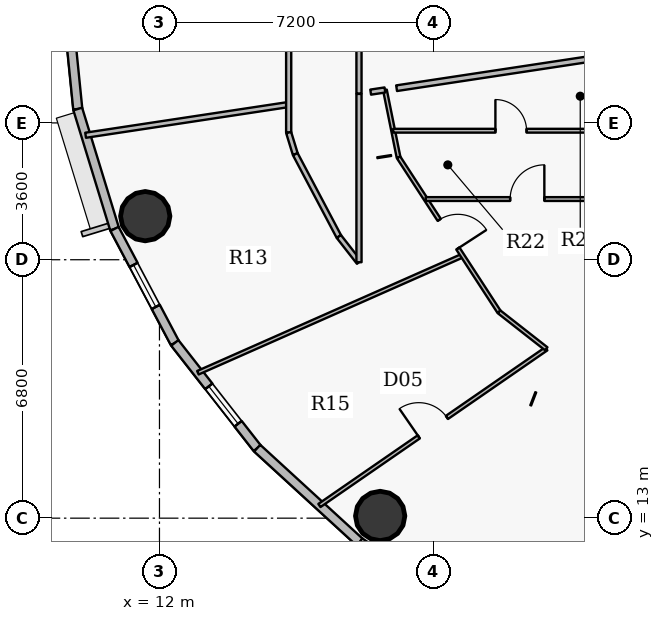
"""IFC4 building model, lengths in metres.
Left out: names, types, materials, properties, quantities, classifications, styles, units other than length and angle.
Written with IfcOpenShell. Run it as: python <this file> out.ifc"""

import sys

from ifc_helpers import new_model, si_unit, direction, frame, frame_2d, origin, origin_2d, place, context, subcontext, project, spatial, rectangle, hollow_circle, extrude, source, transform, mapped, element, fill, save


model = new_model("IFC4")
c1 = context("Model", 3, precision=1e-05, world=origin(), true_north=direction((0.0, 1.0)))
c2 = subcontext(c1, "Body", "Model", "MODEL_VIEW")
j1 = project(units=[si_unit("LENGTHUNIT", "METRE"), si_unit("PLANEANGLEUNIT", "RADIAN")], contexts=[c1])
p1 = place(None, origin())
s1 = spatial("IfcSite", under=j1, at=p1, CompositionType="ELEMENT")
p2 = place(p1, origin())
s2 = spatial("IfcBuilding", under=s1, at=p2, CompositionType="ELEMENT")
p3 = place(p2, frame((0.0, 0.0, 156.15)))
s3 = spatial("IfcBuildingStorey", under=s2, at=p3, CompositionType="ELEMENT", Elevation=156.15)
for number, where, z_axis, x_axis in (
    (1, (11.625, 20.947, 0.0), (0.0, 0.0, 1.0), (1.0, 0.0, 0.0)),
    (2, (17.808, 13.058, 0.0), (0.0, 0.0, 1.0), (1.0, 0.0, 0.0)),
):
    element("IfcColumn", number, at=place(p3, frame(where, z_axis=z_axis, x_axis=x_axis)), inside=s3, PredefinedType="COLUMN", context=c2, shape_type="SweptSolid", body=[
        extrude(hollow_circle(Radius=0.65, WallThickness=0.04, at=origin_2d()), origin(), (0.0, 0.0, 1.0), 3.75),
    ])
p4 = place(p3, frame((9.85, 23.766, 0.0), z_axis=(0.0, 0.0, 1.0), x_axis=(-0.100061534614, 0.994981250723, 0.0)))
e3 = element("IfcWall", 3, at=p4, inside=s3, PredefinedType="SOLIDWALL", context=c2, shape_type="SweptSolid", body=[
    extrude(rectangle(XDim=3.25, YDim=0.24, at=frame_2d((1.625, 0.0))), origin(), (0.0, 0.0, 1.0), 3.5),
])
p5 = place(p3, frame((10.817, 20.611, 0.0), z_axis=(0.0, 0.0, 1.0), x_axis=(-0.293097995113, 0.956082405058, 0.0)))
e4 = element("IfcWall", 4, at=p5, inside=s3, PredefinedType="SOLIDWALL", context=c2, shape_type="SweptSolid", body=[
    extrude(rectangle(XDim=3.3, YDim=0.24, at=frame_2d((1.65, 0.0))), origin(), (0.0, 0.0, 1.0), 3.5),
])
p6 = place(p3, frame((12.404, 17.612, 0.0), z_axis=(0.0, 0.0, 1.0), x_axis=(-0.467586874938, 0.88394712194, 0.0)))
e5 = element("IfcWall", 5, at=p6, inside=s3, PredefinedType="SOLIDWALL", context=c2, shape_type="SweptSolid", body=[
    extrude(rectangle(XDim=3.393, YDim=0.24, at=frame_2d((1.697, 0.0))), origin(), (0.0, 0.0, 1.0), 3.5),
])
p7 = place(p6, frame((1.072, 0.0, 0.9)))
e6 = element("IfcOpeningElement", 6, at=p7, cuts=e5, PredefinedType="OPENING", context=c2, shape_type="SweptSolid", body=[
    extrude(rectangle(XDim=1.25, YDim=1.65, at=origin_2d()), frame((0.625, 0.13, 0.825), z_axis=(0.0, -1.0, 0.0), x_axis=(1.0, 0.0, 0.0)), (0.0, 0.0, 1.0), 0.26),
])
p8 = place(p3, frame((14.572, 14.842, 0.0), z_axis=(0.0, 0.0, 1.0), x_axis=(-0.616287674549, 0.787521112224, 0.0)))
e7 = element("IfcWall", 7, at=p8, inside=s3, PredefinedType="SOLIDWALL", context=c2, shape_type="SweptSolid", body=[
    extrude(rectangle(XDim=3.517, YDim=0.24, at=frame_2d((1.759, 0.0))), origin(), (0.0, 0.0, 1.0), 3.5),
])
p9 = place(p8, frame((0.816, 0.0, 0.9)))
e8 = element("IfcOpeningElement", 8, at=p9, cuts=e7, PredefinedType="OPENING", context=c2, shape_type="SweptSolid", body=[
    extrude(rectangle(XDim=1.25, YDim=1.65, at=origin_2d()), frame((0.625, 0.13, 0.825), z_axis=(0.0, -1.0, 0.0), x_axis=(1.0, 0.0, 0.0)), (0.0, 0.0, 1.0), 0.26),
])
p10 = place(p3, frame((17.268, 12.369, 0.0), z_axis=(0.0, 0.0, 1.0), x_axis=(-0.737076565834, 0.675809245349, 0.0)))
e9 = element("IfcWall", 9, at=p10, inside=s3, PredefinedType="SOLIDWALL", context=c2, shape_type="SweptSolid", body=[
    extrude(rectangle(XDim=3.658, YDim=0.24, at=frame_2d((1.829, 0.0))), origin(), (0.0, 0.0, 1.0), 3.5),
])
p11 = place(p3, frame((20.427, 10.257, 0.0), z_axis=(0.0, 0.0, 1.0), x_axis=(-0.831228998277, 0.555930168657, 0.0)))
e10 = element("IfcWall", 10, at=p11, inside=s3, PredefinedType="SOLIDWALL", context=c2, shape_type="SweptSolid", body=[
    extrude(rectangle(XDim=3.8, YDim=0.24, at=frame_2d((1.9, 0.0))), origin(), (0.0, 0.0, 1.0), 3.5),
])
p12 = place(p3, frame((10.057, 23.075, 0.0), z_axis=(0.0, 0.0, 1.0), x_axis=(0.988756022356, 0.14953771516, 0.0)))
e11 = element("IfcWall", 11, at=p12, inside=s3, PredefinedType="PARTITIONING", context=c2, shape_type="SweptSolid", body=[
    extrude(rectangle(XDim=5.404, YDim=0.135, at=frame_2d((2.702, 0.0))), origin(), (0.0, 0.0, 1.0), 2.935),
])
p13 = place(p3, frame((13.012, 16.827, 0.0), z_axis=(0.0, 0.0, 1.0), x_axis=(0.914460954348, 0.404674144185, 0.0)))
e12 = element("IfcWall", 12, at=p13, inside=s3, PredefinedType="PARTITIONING", context=c2, shape_type="SweptSolid", body=[
    extrude(rectangle(XDim=7.614, YDim=0.1, at=frame_2d((3.807, 0.0))), origin(), (0.0, 0.0, 1.0), 2.935),
])
p14 = place(p3, frame((15.4, 23.146, 0.0), z_axis=(0.0, 0.0, 1.0), x_axis=(0.0, 1.0, 0.0)))
e13 = element("IfcWall", 13, at=p14, inside=s3, PredefinedType="PARTITIONING", context=c2, shape_type="SweptSolid", body=[
    extrude(rectangle(XDim=4.804, YDim=0.135, at=frame_2d((2.402, 0.0))), origin(), (0.0, 0.0, 1.0), 2.935),
])
p15 = place(p14, frame((2.251, 0.0, 0.0)))
e14 = element("IfcOpeningElement", 14, at=p15, cuts=e13, PredefinedType="OPENING", context=c2, shape_type="SweptSolid", body=[
    extrude(rectangle(XDim=1.0, YDim=2.15, at=origin_2d()), frame((0.5, 0.078, 1.075), z_axis=(0.0, -1.0, 0.0), x_axis=(1.0, 0.0, 0.0)), (0.0, 0.0, 1.0), 0.155),
])
p16 = place(p3, frame((15.4, 23.146, 0.0), z_axis=(0.0, 0.0, 1.0), x_axis=(0.293335154151, -0.956009669061, 0.0)))
e15 = element("IfcWall", 15, at=p16, inside=s3, PredefinedType="PARTITIONING", context=c2, shape_type="SweptSolid", body=[
    extrude(rectangle(XDim=0.594, YDim=0.135, at=frame_2d((0.297, 0.0))), origin(), (0.0, 0.0, 1.0), 3.5),
])
p17 = place(p3, frame((15.574, 22.578, 0.0), z_axis=(0.0, 0.0, 1.0), x_axis=(0.46757196543, -0.883955008552, 0.0)))
e16 = element("IfcWall", 16, at=p17, inside=s3, PredefinedType="PARTITIONING", context=c2, shape_type="SweptSolid", body=[
    extrude(rectangle(XDim=2.451, YDim=0.135, at=frame_2d((1.226, 0.0))), origin(), (0.0, 0.0, 1.0), 2.935),
])
p18 = place(p3, frame((16.209, 13.333, 0.0), z_axis=(0.0, 0.0, 1.0), x_axis=(0.82287966827, 0.568215673444, 0.0)))
e17 = element("IfcWall", 17, at=p18, inside=s3, PredefinedType="PARTITIONING", context=c2, shape_type="SweptSolid", body=[
    extrude(rectangle(XDim=7.255, YDim=0.1, at=frame_2d((3.628, 0.0))), origin(), (0.0, 0.0, 1.0), 2.935),
])
p19 = place(p18, frame((3.177, 0.0, 0.0)))
e18 = element("IfcOpeningElement", 18, at=p19, cuts=e17, PredefinedType="OPENING", context=c2, shape_type="SweptSolid", body=[
    extrude(rectangle(XDim=0.9, YDim=2.1, at=origin_2d()), frame((0.45, 0.06, 1.05), z_axis=(0.0, -1.0, 0.0), x_axis=(1.0, 0.0, 0.0)), (0.0, 0.0, 1.0), 0.12),
])
p20 = place(p3, frame((16.72, 20.411, 0.0), z_axis=(0.0, 0.0, 1.0), x_axis=(0.616377221056, -0.787451027914, 0.0)))
e19 = element("IfcWall", 19, at=p20, inside=s3, PredefinedType="PARTITIONING", context=c2, shape_type="SweptSolid", body=[
    extrude(rectangle(XDim=0.859, YDim=0.135, at=frame_2d((0.43, 0.0))), origin(), (0.0, 0.0, 1.0), 3.5),
])
p21 = place(p3, frame((17.25, 19.734, 0.0), z_axis=(0.0, 0.0, 1.0), x_axis=(0.0, 1.0, 0.0)))
e20 = element("IfcWall", 20, at=p21, inside=s3, PredefinedType="PARTITIONING", context=c2, shape_type="SweptSolid", body=[
    extrude(rectangle(XDim=4.429, YDim=0.135, at=frame_2d((2.215, 0.0))), origin(), (0.0, 0.0, 1.0), 2.935),
])
p22 = place(p3, frame((17.933, 24.267, 0.0), z_axis=(0.0, 0.0, 1.0), x_axis=(0.198166528342, -0.980168366682, 0.0)))
e21 = element("IfcWall", 21, at=p22, inside=s3, PredefinedType="PARTITIONING", context=c2, shape_type="SweptSolid", body=[
    extrude(rectangle(XDim=1.809, YDim=0.1, at=frame_2d((0.904, 0.0))), origin(), (0.0, 0.0, 1.0), 2.935),
])
p23 = place(p3, frame((18.15, 23.195, 0.0), z_axis=(0.0, 0.0, 1.0), x_axis=(1.0, 0.0, 0.0)))
e22 = element("IfcWall", 22, at=p23, inside=s3, PredefinedType="PARTITIONING", context=c2, shape_type="SweptSolid", body=[
    extrude(rectangle(XDim=6.2, YDim=0.1, at=frame_2d((3.1, 0.0))), origin(), (0.0, 0.0, 1.0), 2.935),
])
p24 = place(p23, frame((2.69, 0.0, 0.0)))
e23 = element("IfcOpeningElement", 23, at=p24, cuts=e22, PredefinedType="OPENING", context=c2, shape_type="SweptSolid", body=[
    extrude(rectangle(XDim=0.82, YDim=2.1, at=origin_2d()), frame((0.41, 0.06, 1.05), z_axis=(0.0, -1.0, 0.0), x_axis=(1.0, 0.0, 0.0)), (0.0, 0.0, 1.0), 0.12),
])
p25 = place(p3, frame((18.291, 22.494, 0.0), z_axis=(0.0, 0.0, 1.0), x_axis=(0.545405921784, -0.838172047066, 0.0)))
e24 = element("IfcWall", 24, at=p25, inside=s3, PredefinedType="PARTITIONING", context=c2, shape_type="SweptSolid", body=[
    extrude(rectangle(XDim=4.849, YDim=0.1, at=frame_2d((2.425, 0.0))), origin(), (0.0, 0.0, 1.0), 2.935),
])
p26 = place(p25, frame((1.962, 0.0, 0.0)))
e25 = element("IfcOpeningElement", 25, at=p26, cuts=e24, PredefinedType="OPENING", context=c2, shape_type="SweptSolid", body=[
    extrude(rectangle(XDim=0.9, YDim=2.1, at=origin_2d()), frame((0.45, 0.06, 1.05), z_axis=(0.0, -1.0, 0.0), x_axis=(1.0, 0.0, 0.0)), (0.0, 0.0, 1.0), 0.12),
])
p27 = place(p3, frame((19.005, 21.397, 0.0), z_axis=(0.0, 0.0, 1.0), x_axis=(1.0, 0.0, 0.0)))
e26 = element("IfcWall", 26, at=p27, inside=s3, PredefinedType="PARTITIONING", context=c2, shape_type="SweptSolid", body=[
    extrude(rectangle(XDim=5.345, YDim=0.1, at=frame_2d((2.672, 0.0))), origin(), (0.0, 0.0, 1.0), 3.5),
])
p28 = place(p27, frame((2.222, 0.0, 0.0)))
e27 = element("IfcOpeningElement", 27, at=p28, cuts=e26, PredefinedType="OPENING", context=c2, shape_type="SweptSolid", body=[
    extrude(rectangle(XDim=0.9, YDim=2.1, at=origin_2d()), frame((0.45, 0.06, 1.05), z_axis=(0.0, -1.0, 0.0), x_axis=(1.0, 0.0, 0.0)), (0.0, 0.0, 1.0), 0.12),
])
p29 = place(p3, frame((20.936, 18.429, 0.0), z_axis=(0.0, 0.0, 1.0), x_axis=(0.787358146927, -0.61649586249, 0.0)))
e28 = element("IfcWall", 28, at=p29, inside=s3, PredefinedType="PARTITIONING", context=c2, shape_type="SweptSolid", body=[
    extrude(rectangle(XDim=1.579, YDim=0.1, at=frame_2d((0.79, 0.0))), origin(), (0.0, 0.0, 1.0), 3.5),
])
p30 = place(p3, frame((17.25, 26.05, 0.0), z_axis=(0.0, 0.0, 1.0), x_axis=(0.0, -1.0, 0.0)))
e29 = element("IfcWall", 29, at=p30, inside=s3, PredefinedType="PARTITIONING", context=c2, shape_type="SweptSolid", body=[
    extrude(rectangle(XDim=1.876, YDim=0.135, at=frame_2d((0.938, 0.0))), origin(), (0.0, 0.0, 1.0), 3.185),
])
p31 = place(p3, frame((17.558, 24.21, 0.0), z_axis=(0.0, 0.0, 1.0), x_axis=(0.988703952477, 0.149881601124, 0.0)))
e30 = element("IfcWall", 30, at=p31, inside=s3, PredefinedType="PARTITIONING", context=c2, shape_type="SweptSolid", body=[
    extrude(rectangle(XDim=0.38, YDim=0.135, at=frame_2d((0.19, 0.0))), origin(), (0.0, 0.0, 1.0), 3.185),
])
p32 = place(p3, frame((18.24, 24.313, 0.0), z_axis=(0.0, 0.0, 1.0), x_axis=(0.988751262043, 0.149569187364, 0.0)))
e31 = element("IfcWall", 31, at=p32, inside=s3, PredefinedType="PARTITIONING", context=c2, shape_type="SweptSolid", body=[
    extrude(rectangle(XDim=5.848, YDim=0.15, at=frame_2d((2.924, 0.0))), origin(), (0.0, 0.0, 1.0), 3.5),
])
m1 = source(origin(), c2, "Body", "SweptSolid", [
    extrude(rectangle(XDim=1.25, YDim=1.65, at=origin_2d()), frame((0.625, 0.03, 0.825), z_axis=(0.0, -1.0, 0.0), x_axis=(1.0, 0.0, 0.0)), (0.0, 0.0, 1.0), 0.06),
])
p33 = place(p9, origin())
e32 = element("IfcWindow", 32, at=p33, inside=s3, PartitioningType="SINGLE_PANEL", PredefinedType="WINDOW", context=c2, shape_type="MappedRepresentation", body=[
    mapped(m1, transform((0.0, 0.0, 0.0), x_axis=(1.0, 0.0, 0.0), y_axis=(0.0, 1.0, 0.0), z_axis=(0.0, 0.0, 1.0), scale=1.0)),
])
fill(e8, e32)
p34 = place(p7, origin())
e33 = element("IfcWindow", 33, at=p34, inside=s3, PartitioningType="SINGLE_PANEL", PredefinedType="WINDOW", context=c2, shape_type="MappedRepresentation", body=[
    mapped(m1, transform((0.0, 0.0, 0.0), x_axis=(1.0, 0.0, 0.0), y_axis=(0.0, 1.0, 0.0), z_axis=(0.0, 0.0, 1.0), scale=1.0)),
])
fill(e6, e33)
m2 = source(origin(), c2, "Body", "SweptSolid", [
    extrude(rectangle(XDim=0.9, YDim=2.1, at=origin_2d()), frame((0.45, 0.025, 1.05), z_axis=(0.0, -1.0, 0.0), x_axis=(1.0, 0.0, 0.0)), (0.0, 0.0, 1.0), 0.05),
])
p35 = place(p26, origin())
e34 = element("IfcDoor", 34, at=p35, inside=s3, OperationType="SINGLE_SWING_RIGHT", PredefinedType="DOOR", context=c2, shape_type="MappedRepresentation", body=[
    mapped(m2, transform((0.0, 0.0, 0.0), x_axis=(1.0, 0.0, 0.0), y_axis=(0.0, 1.0, 0.0), z_axis=(0.0, 0.0, 1.0), scale=1.0)),
])
fill(e25, e34)
p36 = place(p19, origin())
e35 = element("IfcDoor", 35, at=p36, inside=s3, OperationType="SINGLE_SWING_LEFT", PredefinedType="DOOR", context=c2, shape_type="MappedRepresentation", body=[
    mapped(m2, transform((0.0, 0.0, 0.0), x_axis=(1.0, 0.0, 0.0), y_axis=(0.0, 1.0, 0.0), z_axis=(0.0, 0.0, 1.0), scale=1.0)),
])
fill(e18, e35)
p37 = place(p28, origin())
e36 = element("IfcDoor", 36, at=p37, inside=s3, OperationType="SINGLE_SWING_RIGHT", PredefinedType="DOOR", context=c2, shape_type="MappedRepresentation", body=[
    mapped(m2, transform((0.0, 0.0, 0.0), x_axis=(1.0, 0.0, 0.0), y_axis=(0.0, 1.0, 0.0), z_axis=(0.0, 0.0, 1.0), scale=1.0)),
])
fill(e27, e36)
m3 = source(origin(), c2, "Body", "SweptSolid", [
    extrude(rectangle(XDim=0.82, YDim=2.1, at=origin_2d()), frame((0.41, 0.025, 1.05), z_axis=(0.0, -1.0, 0.0), x_axis=(1.0, 0.0, 0.0)), (0.0, 0.0, 1.0), 0.05),
])
p38 = place(p24, origin())
e37 = element("IfcDoor", 37, at=p38, inside=s3, OperationType="SINGLE_SWING_LEFT", PredefinedType="DOOR", context=c2, shape_type="MappedRepresentation", body=[
    mapped(m3, transform((0.0, 0.0, 0.0), x_axis=(1.0, 0.0, 0.0), y_axis=(0.0, 1.0, 0.0), z_axis=(0.0, 0.0, 1.0), scale=1.0)),
])
fill(e23, e37)
save(model, sys.argv[1])
